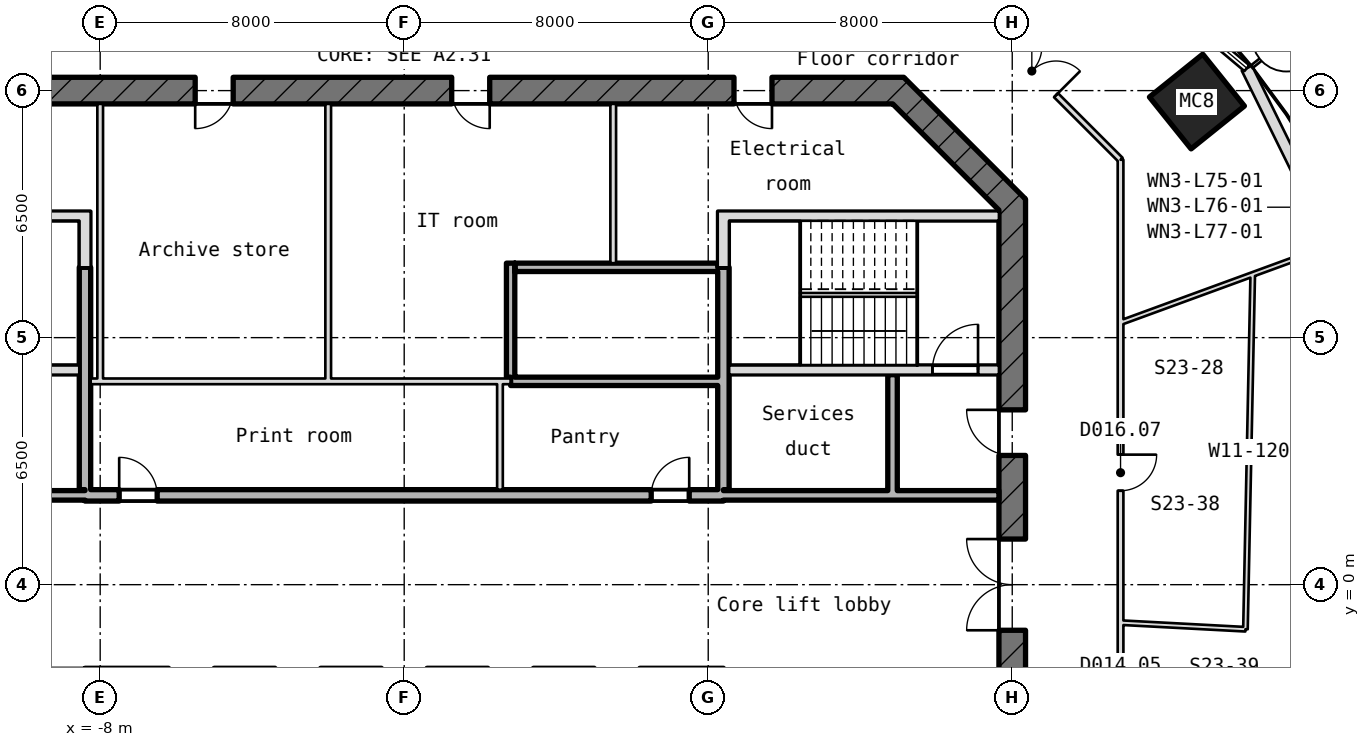
"""IFC4 building model, lengths in metres.
Left out: names, types, materials, properties, quantities, classifications, styles, units other than length and angle.
Written with IfcOpenShell. Run it as: python <this file> out.ifc"""

import sys

from ifc_helpers import new_model, si_unit, direction, frame, frame_2d, origin, origin_2d, place, context, subcontext, project, spatial, rectangle, hollow_rectangle, extrude, element, fill, save


model = new_model("IFC4")
c1 = context("Model", 3, precision=1e-05, world=origin(), true_north=direction((0.0, 1.0)))
c2 = subcontext(c1, "Body", "Model", "MODEL_VIEW")
j1 = project(units=[si_unit("LENGTHUNIT", "METRE"), si_unit("PLANEANGLEUNIT", "RADIAN")], contexts=[c1])
p1 = place(None, origin())
s1 = spatial("IfcSite", under=j1, at=p1, CompositionType="ELEMENT")
p2 = place(p1, origin())
s2 = spatial("IfcBuilding", under=s1, at=p2, CompositionType="ELEMENT")
p3 = place(p2, frame((0.0, 0.0, 334.3)))
s3 = spatial("IfcBuildingStorey", under=s2, at=p3, CompositionType="ELEMENT", Elevation=334.3)
p4 = place(p3, frame((20.86, 12.712, -0.18), z_axis=(0.0, 0.0, 1.0), x_axis=(0.626371189031, -0.779524940943, 0.0)))
e1 = element("IfcColumn", 1, at=p4, inside=s3, PredefinedType="COLUMN", context=c2, shape_type="SweptSolid", body=[
    extrude(hollow_rectangle(XDim=1.75, YDim=1.8, WallThickness=0.055, at=origin_2d()), origin(), (0.0, 0.0, 1.0), 4.15),
])
p5 = place(p3, frame((26.227, 5.356, 0.0), z_axis=(0.0, 0.0, 1.0), x_axis=(-0.441682707494, 0.89717132472, 0.0)))
e2 = element("IfcWall", 2, at=p5, inside=s3, PredefinedType="SOLIDWALL", context=c2, shape_type="SweptSolid", body=[
    extrude(rectangle(XDim=9.178, YDim=0.3, at=frame_2d((4.589, 0.0))), origin(), (0.0, 0.0, 1.0), 3.97),
])
p6 = place(p5, frame((1.9, 0.0, 0.0)))
e3 = element("IfcOpeningElement", 3, at=p6, cuts=e2, PredefinedType="OPENING", context=c2, shape_type="SweptSolid", body=[
    extrude(rectangle(XDim=1.8, YDim=2.4, at=frame_2d((0.9, 1.2))), frame((0.0, 0.16, 0.0), z_axis=(0.0, -1.0, 0.0), x_axis=(1.0, 0.0, 0.0)), (0.0, 0.0, 1.0), 0.32),
])
p7 = place(p5, frame((4.3, 0.0, 0.9)))
e4 = element("IfcOpeningElement", 4, at=p7, cuts=e2, PredefinedType="OPENING", context=c2, shape_type="SweptSolid", body=[
    extrude(rectangle(XDim=1.6, YDim=1.5, at=frame_2d((0.8, 0.75))), frame((0.0, 0.16, 0.0), z_axis=(0.0, -1.0, 0.0), x_axis=(1.0, 0.0, 0.0)), (0.0, 0.0, 1.0), 0.32),
])
p8 = place(p3, frame((16.0, -10.145, -0.18), z_axis=(0.0, 0.0, 1.0), x_axis=(0.0, 1.0, 0.0)))
e5 = element("IfcWall", 5, at=p8, inside=s3, PredefinedType="SHEAR", context=c2, shape_type="SweptSolid", body=[
    extrude(rectangle(XDim=20.29, YDim=0.7, at=frame_2d((10.145, 0.0))), origin(), (0.0, 0.0, 1.0), 4.15),
])
p9 = place(p8, frame((8.945, 0.0, 0.18)))
e6 = element("IfcOpeningElement", 6, at=p9, cuts=e5, PredefinedType="OPENING", context=c2, shape_type="SweptSolid", body=[
    extrude(rectangle(XDim=2.4, YDim=2.1, at=frame_2d((1.2, 1.05))), frame((0.0, 0.36, 0.0), z_axis=(0.0, -1.0, 0.0), x_axis=(1.0, 0.0, 0.0)), (0.0, 0.0, 1.0), 0.72),
])
p10 = place(p8, frame((13.545, 0.0, 0.18)))
e7 = element("IfcOpeningElement", 7, at=p10, cuts=e5, PredefinedType="OPENING", context=c2, shape_type="SweptSolid", body=[
    extrude(rectangle(XDim=1.2, YDim=2.1, at=frame_2d((0.6, 1.05))), frame((0.0, 0.36, 0.0), z_axis=(0.0, -1.0, 0.0), x_axis=(1.0, 0.0, 0.0)), (0.0, 0.0, 1.0), 0.72),
])
p11 = place(p8, frame((2.4, 0.0, 0.18)))
e8 = element("IfcOpeningElement", 8, at=p11, cuts=e5, PredefinedType="OPENING", context=c2, shape_type="SweptSolid", body=[
    extrude(rectangle(XDim=1.2, YDim=2.1, at=frame_2d((0.6, 1.05))), frame((0.0, 0.36, 0.0), z_axis=(0.0, -1.0, 0.0), x_axis=(1.0, 0.0, 0.0)), (0.0, 0.0, 1.0), 0.72),
])
p12 = place(p3, frame((16.103, 9.897, -0.18), z_axis=(0.0, 0.0, 1.0), x_axis=(-0.707106781187, 0.707106781187, 0.0)))
e9 = element("IfcWall", 9, at=p12, inside=s3, PredefinedType="SHEAR", context=c2, shape_type="SweptSolid", body=[
    extrude(rectangle(XDim=4.533, YDim=0.7, at=frame_2d((2.266, 0.0))), origin(), (0.0, 0.0, 1.0), 4.15),
])
p13 = place(p3, frame((13.145, 13.0, -0.18), z_axis=(0.0, 0.0, 1.0), x_axis=(-1.0, 0.0, 0.0)))
e10 = element("IfcWall", 10, at=p13, inside=s3, PredefinedType="SHEAR", context=c2, shape_type="SweptSolid", body=[
    extrude(rectangle(XDim=26.29, YDim=0.7, at=frame_2d((13.145, 0.0))), origin(), (0.0, 0.0, 1.0), 4.15),
])
p14 = place(p13, frame((22.89, 0.0, 0.18)))
e11 = element("IfcOpeningElement", 11, at=p14, cuts=e10, PredefinedType="OPENING", context=c2, shape_type="SweptSolid", body=[
    extrude(rectangle(XDim=1.0, YDim=2.1, at=frame_2d((0.5, 1.05))), frame((0.0, 0.36, 0.0), z_axis=(0.0, -1.0, 0.0), x_axis=(1.0, 0.0, 0.0)), (0.0, 0.0, 1.0), 0.72),
])
p15 = place(p13, frame((17.645, 0.0, 0.18)))
e12 = element("IfcOpeningElement", 12, at=p15, cuts=e10, PredefinedType="OPENING", context=c2, shape_type="SweptSolid", body=[
    extrude(rectangle(XDim=1.0, YDim=2.1, at=frame_2d((0.5, 1.05))), frame((0.0, 0.36, 0.0), z_axis=(0.0, -1.0, 0.0), x_axis=(1.0, 0.0, 0.0)), (0.0, 0.0, 1.0), 0.72),
])
p16 = place(p13, frame((10.895, 0.0, 0.18)))
e13 = element("IfcOpeningElement", 13, at=p16, cuts=e10, PredefinedType="OPENING", context=c2, shape_type="SweptSolid", body=[
    extrude(rectangle(XDim=1.0, YDim=2.1, at=frame_2d((0.5, 1.05))), frame((0.0, 0.36, 0.0), z_axis=(0.0, -1.0, 0.0), x_axis=(1.0, 0.0, 0.0)), (0.0, 0.0, 1.0), 0.72),
])
p17 = place(p13, frame((3.467, 0.0, 0.18)))
e14 = element("IfcOpeningElement", 14, at=p17, cuts=e10, PredefinedType="OPENING", context=c2, shape_type="SweptSolid", body=[
    extrude(rectangle(XDim=1.0, YDim=2.1, at=frame_2d((0.5, 1.05))), frame((0.0, 0.36, 0.0), z_axis=(0.0, -1.0, 0.0), x_axis=(1.0, 0.0, 0.0)), (0.0, 0.0, 1.0), 0.72),
])
p18 = place(p3, frame((-15.65, 2.35, 0.0), z_axis=(0.0, 0.0, 1.0), x_axis=(1.0, 0.0, 0.0)))
e15 = element("IfcWall", 15, at=p18, inside=s3, PredefinedType="STANDARD", context=c2, shape_type="SweptSolid", body=[
    extrude(rectangle(XDim=7.25, YDim=0.25, at=frame_2d((3.625, 0.0))), origin(), (0.0, 0.0, 1.0), 3.97),
])
p19 = place(p3, frame((-8.4, 2.35, -0.18), z_axis=(0.0, 0.0, 1.0), x_axis=(1.0, 0.0, 0.0)))
e16 = element("IfcWall", 16, at=p19, inside=s3, PredefinedType="SHEAR", context=c2, shape_type="SweptSolid", body=[
    extrude(rectangle(XDim=16.8, YDim=0.3, at=frame_2d((8.4, 0.0))), origin(), (0.0, 0.0, 1.0), 4.15),
])
p20 = place(p19, frame((0.9, 0.0, 0.18)))
e17 = element("IfcOpeningElement", 17, at=p20, cuts=e16, PredefinedType="OPENING", context=c2, shape_type="SweptSolid", body=[
    extrude(rectangle(XDim=1.0, YDim=2.1, at=frame_2d((0.5, 1.05))), frame((0.0, 0.16, 0.0), z_axis=(0.0, -1.0, 0.0), x_axis=(1.0, 0.0, 0.0)), (0.0, 0.0, 1.0), 0.32),
])
p21 = place(p19, frame((14.9, 0.0, 0.18)))
e18 = element("IfcOpeningElement", 18, at=p21, cuts=e16, PredefinedType="OPENING", context=c2, shape_type="SweptSolid", body=[
    extrude(rectangle(XDim=1.0, YDim=2.1, at=frame_2d((0.5, 1.05))), frame((0.0, 0.16, 0.0), z_axis=(0.0, -1.0, 0.0), x_axis=(1.0, 0.0, 0.0)), (0.0, 0.0, 1.0), 0.32),
])
p22 = place(p3, frame((8.4, 2.35, 0.0), z_axis=(0.0, 0.0, 1.0), x_axis=(1.0, 0.0, 0.0)))
e19 = element("IfcWall", 19, at=p22, inside=s3, PredefinedType="STANDARD", context=c2, shape_type="SweptSolid", body=[
    extrude(rectangle(XDim=7.25, YDim=0.25, at=frame_2d((3.625, 0.0))), origin(), (0.0, 0.0, 1.0), 3.97),
])
p23 = place(p3, frame((-8.25, 5.35, 0.0), z_axis=(0.0, 0.0, 1.0), x_axis=(1.0, 0.0, 0.0)))
e20 = element("IfcWall", 20, at=p23, inside=s3, PredefinedType="PARTITIONING", context=c2, shape_type="SweptSolid", body=[
    extrude(rectangle(XDim=11.05, YDim=0.15, at=frame_2d((5.525, 0.0))), origin(), (0.0, 0.0, 1.0), 3.97),
])
p24 = place(p3, frame((2.8, 5.35, 0.0), z_axis=(0.0, 0.0, 1.0), x_axis=(1.0, 0.0, 0.0)))
e21 = element("IfcWall", 21, at=p24, inside=s3, PredefinedType="STANDARD", context=c2, shape_type="SweptSolid", body=[
    extrude(rectangle(XDim=5.45, YDim=0.22, at=frame_2d((2.725, 0.0))), origin(), (0.0, 0.0, 1.0), 3.97),
])
p25 = place(p3, frame((-15.65, 5.65, -0.18), z_axis=(0.0, 0.0, 1.0), x_axis=(1.0, 0.0, 0.0)))
e22 = element("IfcWall", 22, at=p25, inside=s3, PredefinedType="SHEAR", context=c2, shape_type="SweptSolid", body=[
    extrude(rectangle(XDim=7.1, YDim=0.25, at=frame_2d((3.55, 0.0))), origin(), (0.0, 0.0, 1.0), 4.15),
])
p26 = place(p25, frame((0.55, 0.0, 0.18)))
e23 = element("IfcOpeningElement", 23, at=p26, cuts=e22, PredefinedType="OPENING", context=c2, shape_type="SweptSolid", body=[
    extrude(rectangle(XDim=1.2, YDim=2.1, at=frame_2d((0.6, 1.05))), frame((0.0, 0.135, 0.0), z_axis=(0.0, -1.0, 0.0), x_axis=(1.0, 0.0, 0.0)), (0.0, 0.0, 1.0), 0.27),
])
p27 = place(p3, frame((8.55, 5.65, -0.18), z_axis=(0.0, 0.0, 1.0), x_axis=(1.0, 0.0, 0.0)))
e24 = element("IfcWall", 24, at=p27, inside=s3, PredefinedType="SHEAR", context=c2, shape_type="SweptSolid", body=[
    extrude(rectangle(XDim=7.1, YDim=0.25, at=frame_2d((3.55, 0.0))), origin(), (0.0, 0.0, 1.0), 4.15),
])
p28 = place(p27, frame((5.35, 0.0, 0.18)))
e25 = element("IfcOpeningElement", 25, at=p28, cuts=e24, PredefinedType="OPENING", context=c2, shape_type="SweptSolid", body=[
    extrude(rectangle(XDim=1.2, YDim=2.1, at=frame_2d((0.6, 1.05))), frame((0.0, 0.135, 0.0), z_axis=(0.0, -1.0, 0.0), x_axis=(1.0, 0.0, 0.0)), (0.0, 0.0, 1.0), 0.27),
])
p29 = place(p3, frame((2.91, 8.35, 0.0), z_axis=(0.0, 0.0, 1.0), x_axis=(1.0, 0.0, 0.0)))
e26 = element("IfcWall", 26, at=p29, inside=s3, PredefinedType="STANDARD", context=c2, shape_type="SweptSolid", body=[
    extrude(rectangle(XDim=5.34, YDim=0.22, at=frame_2d((2.67, 0.0))), origin(), (0.0, 0.0, 1.0), 3.97),
])
for number, where, z_axis, x_axis in (
    (27, (-15.65, 9.7, -0.18), (0.0, 0.0, 1.0), (1.0, 0.0, 0.0)),
    (28, (8.55, 9.7, -0.18), (0.0, 0.0, 1.0), (1.0, 0.0, 0.0)),
):
    element("IfcWall", number, at=place(p3, frame(where, z_axis=z_axis, x_axis=x_axis)), inside=s3, PredefinedType="SHEAR", context=c2, shape_type="SweptSolid", body=[
        extrude(rectangle(XDim=7.1, YDim=0.25, at=frame_2d((3.55, 0.0))), origin(), (0.0, 0.0, 1.0), 4.15),
    ])
p30 = place(p3, frame((-8.4, 2.5, -0.18), z_axis=(0.0, 0.0, 1.0), x_axis=(0.0, 1.0, 0.0)))
e29 = element("IfcWall", 29, at=p30, inside=s3, PredefinedType="SHEAR", context=c2, shape_type="SweptSolid", body=[
    extrude(rectangle(XDim=5.85, YDim=0.3, at=frame_2d((2.925, 0.0))), origin(), (0.0, 0.0, 1.0), 4.15),
])
p31 = place(p3, frame((-8.4, 8.35, -0.18), z_axis=(0.0, 0.0, 1.0), x_axis=(0.0, 1.0, 0.0)))
e30 = element("IfcWall", 30, at=p31, inside=s3, PredefinedType="SHEAR", context=c2, shape_type="SweptSolid", body=[
    extrude(rectangle(XDim=1.475, YDim=0.3, at=frame_2d((0.737, 0.0))), origin(), (0.0, 0.0, 1.0), 4.15),
])
for number, where, z_axis, x_axis in (
    (31, (-8.0, 5.425, 0.0), (0.0, 0.0, 1.0), (0.0, 1.0, 0.0)),
    (32, (-2.0, 5.425, 0.0), (0.0, 0.0, 1.0), (0.0, 1.0, 0.0)),
):
    element("IfcWall", number, at=place(p3, frame(where, z_axis=z_axis, x_axis=x_axis)), inside=s3, PredefinedType="PARTITIONING", context=c2, shape_type="SweptSolid", body=[
        extrude(rectangle(XDim=7.225, YDim=0.15, at=frame_2d((3.612, 0.0))), origin(), (0.0, 0.0, 1.0), 3.97),
    ])
p32 = place(p3, frame((2.52, 2.5, 0.0), z_axis=(0.0, 0.0, 1.0), x_axis=(0.0, 1.0, 0.0)))
e33 = element("IfcWall", 33, at=p32, inside=s3, PredefinedType="PARTITIONING", context=c2, shape_type="SweptSolid", body=[
    extrude(rectangle(XDim=2.775, YDim=0.15, at=frame_2d((1.387, 0.0))), origin(), (0.0, 0.0, 1.0), 3.97),
])
p33 = place(p3, frame((2.8, 5.46, 0.0), z_axis=(0.0, 0.0, 1.0), x_axis=(0.0, 1.0, 0.0)))
e34 = element("IfcWall", 34, at=p33, inside=s3, PredefinedType="STANDARD", context=c2, shape_type="SweptSolid", body=[
    extrude(rectangle(XDim=3.0, YDim=0.22, at=frame_2d((1.5, 0.0))), origin(), (0.0, 0.0, 1.0), 3.97),
])
p34 = place(p3, frame((5.5, 8.46, 0.0), z_axis=(0.0, 0.0, 1.0), x_axis=(0.0, 1.0, 0.0)))
e35 = element("IfcWall", 35, at=p34, inside=s3, PredefinedType="PARTITIONING", context=c2, shape_type="SweptSolid", body=[
    extrude(rectangle(XDim=4.19, YDim=0.15, at=frame_2d((2.095, 0.0))), origin(), (0.0, 0.0, 1.0), 3.97),
])
p35 = place(p3, frame((8.4, 2.5, -0.18), z_axis=(0.0, 0.0, 1.0), x_axis=(0.0, 1.0, 0.0)))
e36 = element("IfcWall", 36, at=p35, inside=s3, PredefinedType="SHEAR", context=c2, shape_type="SweptSolid", body=[
    extrude(rectangle(XDim=5.85, YDim=0.3, at=frame_2d((2.925, 0.0))), origin(), (0.0, 0.0, 1.0), 4.15),
])
p36 = place(p3, frame((8.4, 8.35, -0.18), z_axis=(0.0, 0.0, 1.0), x_axis=(0.0, 1.0, 0.0)))
e37 = element("IfcWall", 37, at=p36, inside=s3, PredefinedType="SHEAR", context=c2, shape_type="SweptSolid", body=[
    extrude(rectangle(XDim=1.475, YDim=0.3, at=frame_2d((0.737, 0.0))), origin(), (0.0, 0.0, 1.0), 4.15),
])
p37 = place(p3, frame((12.85, 2.475, 0.0), z_axis=(0.0, 0.0, 1.0), x_axis=(0.0, 1.0, 0.0)))
e38 = element("IfcWall", 38, at=p37, inside=s3, PredefinedType="STANDARD", context=c2, shape_type="SweptSolid", body=[
    extrude(rectangle(XDim=3.05, YDim=0.25, at=frame_2d((1.525, 0.0))), origin(), (0.0, 0.0, 1.0), 3.97),
])
p38 = place(p3, frame((14.18, 15.85, 0.0), z_axis=(0.0, 0.0, 1.0), x_axis=(0.707106781187, -0.707106781187, 0.0)))
e39 = element("IfcWall", 39, at=p38, inside=s3, PredefinedType="PARTITIONING", context=c2, shape_type="SweptSolid", body=[
    extrude(rectangle(XDim=6.604, YDim=0.15, at=frame_2d((3.302, 0.0))), origin(), (0.0, 0.0, 1.0), 3.97),
])
p39 = place(p38, frame((2.402, 0.0, 0.0)))
e40 = element("IfcOpeningElement", 40, at=p39, cuts=e39, PredefinedType="OPENING", context=c2, shape_type="SweptSolid", body=[
    extrude(rectangle(XDim=1.8, YDim=2.1, at=frame_2d((0.9, 1.05))), frame((0.0, 0.085, 0.0), z_axis=(0.0, -1.0, 0.0), x_axis=(1.0, 0.0, 0.0)), (0.0, 0.0, 1.0), 0.17),
])
p40 = place(p3, frame((18.85, 6.893, 0.0), z_axis=(0.0, 0.0, 1.0), x_axis=(0.939166586635, 0.34346196667, 0.0)))
e41 = element("IfcWall", 41, at=p40, inside=s3, PredefinedType="PARTITIONING", context=c2, shape_type="SweptSolid", body=[
    extrude(rectangle(XDim=5.974, YDim=0.12, at=frame_2d((2.987, 0.0))), origin(), (0.0, 0.0, 1.0), 3.97),
])
p41 = place(p3, frame((18.85, 11.18, 0.0), z_axis=(0.0, 0.0, 1.0), x_axis=(0.0, -1.0, 0.0)))
e42 = element("IfcWall", 42, at=p41, inside=s3, PredefinedType="PARTITIONING", context=c2, shape_type="SweptSolid", body=[
    extrude(rectangle(XDim=22.361, YDim=0.15, at=frame_2d((11.18, 0.0))), origin(), (0.0, 0.0, 1.0), 3.97),
])
p42 = place(p41, frame((7.759, 0.0, 0.0)))
e43 = element("IfcOpeningElement", 43, at=p42, cuts=e42, PredefinedType="OPENING", context=c2, shape_type="SweptSolid", body=[
    extrude(rectangle(XDim=0.95, YDim=2.1, at=frame_2d((0.475, 1.05))), frame((0.0, 0.085, 0.0), z_axis=(0.0, -1.0, 0.0), x_axis=(1.0, 0.0, 0.0)), (0.0, 0.0, 1.0), 0.17),
])
p43 = place(p41, frame((14.009, 0.0, 0.0)))
e44 = element("IfcOpeningElement", 44, at=p43, cuts=e42, PredefinedType="OPENING", context=c2, shape_type="SweptSolid", body=[
    extrude(rectangle(XDim=1.8, YDim=2.1, at=frame_2d((0.9, 1.05))), frame((0.0, 0.085, 0.0), z_axis=(0.0, -1.0, 0.0), x_axis=(1.0, 0.0, 0.0)), (0.0, 0.0, 1.0), 0.17),
])
p44 = place(p3, frame((22.137, -1.173, 0.0), z_axis=(0.0, 0.0, 1.0), x_axis=(0.020545219347, 0.999788924705, 0.0)))
e45 = element("IfcWall", 45, at=p44, inside=s3, PredefinedType="PARTITIONING", context=c2, shape_type="SweptSolid", body=[
    extrude(rectangle(XDim=9.34, YDim=0.12, at=frame_2d((4.67, 0.0))), origin(), (0.0, 0.0, 1.0), 3.97),
])
p45 = place(p3, frame((22.137, -1.173, 0.0), z_axis=(0.0, 0.0, 1.0), x_axis=(-0.99860035673, 0.052889767817, 0.0)))
e46 = element("IfcWall", 46, at=p45, inside=s3, PredefinedType="PARTITIONING", context=c2, shape_type="SweptSolid", body=[
    extrude(rectangle(XDim=3.291, YDim=0.12, at=frame_2d((1.646, 0.0))), origin(), (0.0, 0.0, 1.0), 3.97),
])
p46 = place(p28, origin())
e47 = element("IfcDoor", 47, at=p46, inside=s3, OperationType="SINGLE_SWING_RIGHT", PredefinedType="DOOR", context=c2, shape_type="SweptSolid", body=[
    extrude(rectangle(XDim=1.2, YDim=2.1, at=frame_2d((0.6, 1.05))), frame((0.0, 0.025, 0.0), z_axis=(0.0, -1.0, 0.0), x_axis=(1.0, 0.0, 0.0)), (0.0, 0.0, 1.0), 0.05),
])
fill(e25, e47)
p47 = place(p9, origin())
e48 = element("IfcDoor", 48, at=p47, inside=s3, OperationType="DOUBLE_DOOR_SINGLE_SWING", PredefinedType="DOOR", context=c2, shape_type="SweptSolid", body=[
    extrude(rectangle(XDim=2.4, YDim=2.1, at=frame_2d((1.2, 1.05))), frame((0.0, 0.025, 0.0), z_axis=(0.0, -1.0, 0.0), x_axis=(1.0, 0.0, 0.0)), (0.0, 0.0, 1.0), 0.05),
])
fill(e6, e48)
p48 = place(p10, origin())
e49 = element("IfcDoor", 49, at=p48, inside=s3, OperationType="SINGLE_SWING_RIGHT", PredefinedType="DOOR", context=c2, shape_type="SweptSolid", body=[
    extrude(rectangle(XDim=1.2, YDim=2.1, at=frame_2d((0.6, 1.05))), frame((0.0, 0.025, 0.0), z_axis=(0.0, -1.0, 0.0), x_axis=(1.0, 0.0, 0.0)), (0.0, 0.0, 1.0), 0.05),
])
fill(e7, e49)
p49 = place(p20, origin())
e50 = element("IfcDoor", 50, at=p49, inside=s3, OperationType="SINGLE_SWING_RIGHT", PredefinedType="DOOR", context=c2, shape_type="SweptSolid", body=[
    extrude(rectangle(XDim=1.0, YDim=2.1, at=frame_2d((0.5, 1.05))), frame((0.0, 0.025, 0.0), z_axis=(0.0, -1.0, 0.0), x_axis=(1.0, 0.0, 0.0)), (0.0, 0.0, 1.0), 0.05),
])
fill(e17, e50)
p50 = place(p21, origin())
e51 = element("IfcDoor", 51, at=p50, inside=s3, OperationType="SINGLE_SWING_RIGHT", PredefinedType="DOOR", context=c2, shape_type="SweptSolid", body=[
    extrude(rectangle(XDim=1.0, YDim=2.1, at=frame_2d((0.5, 1.05))), frame((0.0, 0.025, 0.0), z_axis=(0.0, -1.0, 0.0), x_axis=(1.0, 0.0, 0.0)), (0.0, 0.0, 1.0), 0.05),
])
fill(e18, e51)
p51 = place(p15, origin())
e52 = element("IfcDoor", 52, at=p51, inside=s3, OperationType="SINGLE_SWING_RIGHT", PredefinedType="DOOR", context=c2, shape_type="SweptSolid", body=[
    extrude(rectangle(XDim=1.0, YDim=2.1, at=frame_2d((0.5, 1.05))), frame((0.0, 0.025, 0.0), z_axis=(0.0, -1.0, 0.0), x_axis=(1.0, 0.0, 0.0)), (0.0, 0.0, 1.0), 0.05),
])
fill(e12, e52)
p52 = place(p16, origin())
e53 = element("IfcDoor", 53, at=p52, inside=s3, OperationType="SINGLE_SWING_RIGHT", PredefinedType="DOOR", context=c2, shape_type="SweptSolid", body=[
    extrude(rectangle(XDim=1.0, YDim=2.1, at=frame_2d((0.5, 1.05))), frame((0.0, 0.025, 0.0), z_axis=(0.0, -1.0, 0.0), x_axis=(1.0, 0.0, 0.0)), (0.0, 0.0, 1.0), 0.05),
])
fill(e13, e53)
p53 = place(p17, origin())
e54 = element("IfcDoor", 54, at=p53, inside=s3, OperationType="SINGLE_SWING_RIGHT", PredefinedType="DOOR", context=c2, shape_type="SweptSolid", body=[
    extrude(rectangle(XDim=1.0, YDim=2.1, at=frame_2d((0.5, 1.05))), frame((0.0, 0.025, 0.0), z_axis=(0.0, -1.0, 0.0), x_axis=(1.0, 0.0, 0.0)), (0.0, 0.0, 1.0), 0.05),
])
fill(e14, e54)
p54 = place(p39, origin())
e55 = element("IfcDoor", 55, at=p54, inside=s3, OperationType="DOUBLE_DOOR_SINGLE_SWING", PredefinedType="DOOR", context=c2, shape_type="SweptSolid", body=[
    extrude(rectangle(XDim=1.8, YDim=2.1, at=frame_2d((0.9, 1.05))), frame((0.0, 0.025, 0.0), z_axis=(0.0, -1.0, 0.0), x_axis=(1.0, 0.0, 0.0)), (0.0, 0.0, 1.0), 0.05),
])
fill(e40, e55)
p55 = place(p42, origin())
e56 = element("IfcDoor", 56, at=p55, inside=s3, OperationType="SINGLE_SWING_RIGHT", PredefinedType="DOOR", context=c2, shape_type="SweptSolid", body=[
    extrude(rectangle(XDim=0.95, YDim=2.1, at=frame_2d((0.475, 1.05))), frame((0.0, 0.025, 0.0), z_axis=(0.0, -1.0, 0.0), x_axis=(1.0, 0.0, 0.0)), (0.0, 0.0, 1.0), 0.05),
])
fill(e43, e56)
save(model, sys.argv[1])
